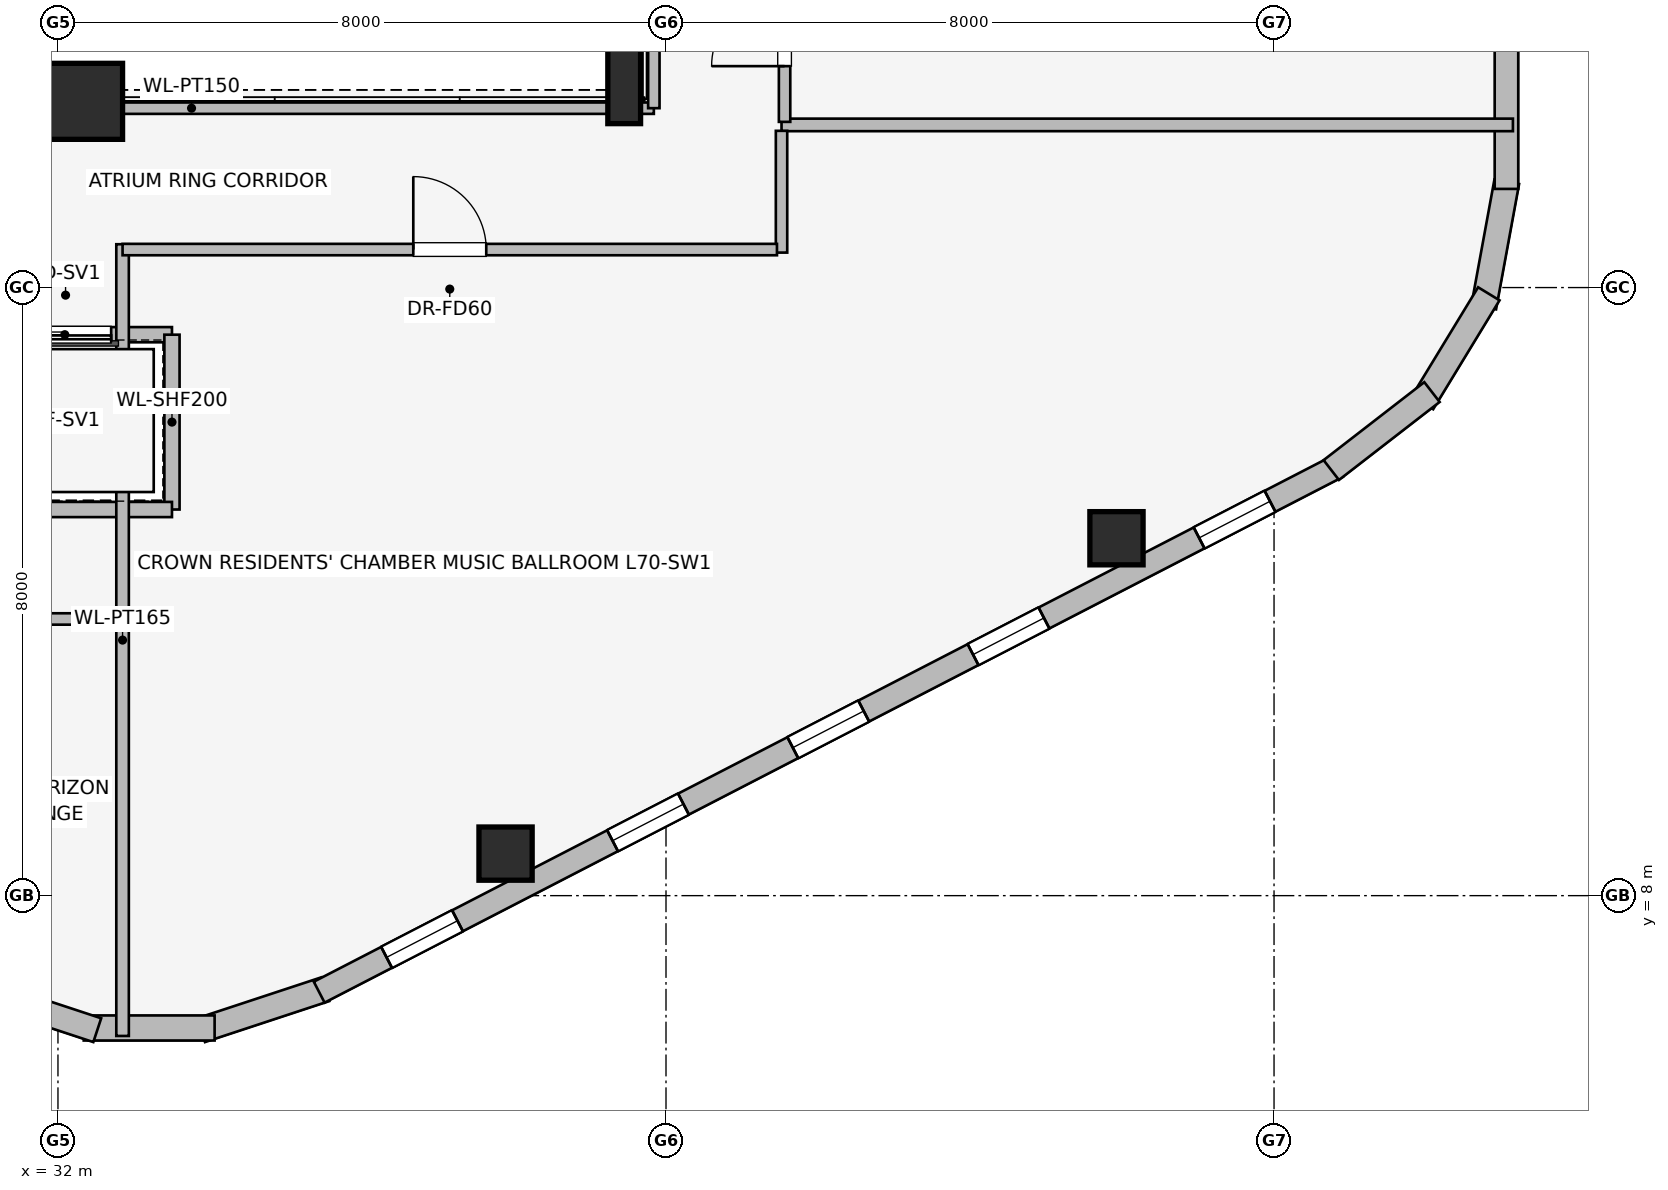
"""IFC4 building model, lengths in metres.
Left out: names, types, materials, properties, quantities, classifications, styles, units other than length and angle.
Written with IfcOpenShell. Run it as: python <this file> out.ifc"""

import sys

from ifc_helpers import new_model, si_unit, direction, frame, frame_2d, origin, origin_2d, place, context, subcontext, project, spatial, rectangle, i_section, extrude, element, fill, save


model = new_model("IFC4")
c1 = context("Model", 3, precision=1e-05, world=origin(), true_north=direction((0.0, 1.0)))
c2 = subcontext(c1, "Body", "Model", "MODEL_VIEW")
j1 = project(units=[si_unit("LENGTHUNIT", "METRE"), si_unit("PLANEANGLEUNIT", "RADIAN")], contexts=[c1])
p1 = place(None, origin())
s1 = spatial("IfcSite", under=j1, at=p1, CompositionType="ELEMENT")
p2 = place(p1, origin())
s2 = spatial("IfcBuilding", under=s1, at=p2, CompositionType="ELEMENT")
p3 = place(p2, frame((0.0, 0.0, 256.1)))
s3 = spatial("IfcBuildingStorey", under=s2, at=p3, CompositionType="ELEMENT", Elevation=256.1)
p4 = place(p3, frame((32.35, 18.45, 0.0), z_axis=(0.0, 0.0, 1.0), x_axis=(1.0, 0.0, 0.0)))
e1 = element("IfcColumn", 1, at=p4, inside=s3, PredefinedType="COLUMN", context=c2, shape_type="SweptSolid", body=[
    extrude(rectangle(XDim=1.0, YDim=1.0, at=origin_2d()), origin(), (0.0, 0.0, 1.0), 3.55),
])
for number, where, z_axis, x_axis in (
    (2, (37.889, 8.553, 0.0), (0.0, 0.0, 1.0), (1.0, 0.0, 0.0)),
    (3, (45.927, 12.702, 0.0), (0.0, 0.0, 1.0), (1.0, 0.0, 0.0)),
):
    element("IfcColumn", number, at=place(p3, frame(where, z_axis=z_axis, x_axis=x_axis)), inside=s3, PredefinedType="COLUMN", context=c2, shape_type="SweptSolid", body=[
        extrude(rectangle(XDim=0.7, YDim=0.7, at=origin_2d()), origin(), (0.0, 0.0, 1.0), 3.55),
    ])
p5 = place(p3, frame((39.45, 18.65, 0.0), z_axis=(0.0, 0.0, 1.0), x_axis=(1.0, 0.0, 0.0)))
e4 = element("IfcColumn", 4, at=p5, inside=s3, PredefinedType="COLUMN", context=c2, shape_type="SweptSolid", body=[
    extrude(i_section(OverallWidth=0.431, OverallDepth=0.987, WebThickness=0.034, FlangeThickness=0.062, at=origin_2d()), origin(), (0.0, 0.0, 1.0), 3.55),
])
p6 = place(p3, frame((35.518, 6.769, 0.0), z_axis=(0.0, 0.0, 1.0), x_axis=(-0.949713440491, -0.313120393699, 0.0)))
e5 = element("IfcWall", 5, at=p6, inside=s3, PredefinedType="STANDARD", context=c2, shape_type="SweptSolid", body=[
    extrude(rectangle(XDim=1.722, YDim=0.33, at=frame_2d((0.861, 0.0))), origin(), (0.0, 0.0, 1.0), 3.29),
])
p7 = place(p3, frame((34.061, 6.259, 0.0), z_axis=(0.0, 0.0, 1.0), x_axis=(-1.0, 0.0, 0.0)))
e6 = element("IfcWall", 6, at=p7, inside=s3, PredefinedType="STANDARD", context=c2, shape_type="SweptSolid", body=[
    extrude(rectangle(XDim=1.722, YDim=0.33, at=frame_2d((0.861, 0.0))), origin(), (0.0, 0.0, 1.0), 3.29),
])
p8 = place(p3, frame((32.517, 6.23, 0.0), z_axis=(0.0, 0.0, 1.0), x_axis=(-0.949713440491, 0.313120393699, 0.0)))
e7 = element("IfcWall", 7, at=p8, inside=s3, PredefinedType="STANDARD", context=c2, shape_type="SweptSolid", body=[
    extrude(rectangle(XDim=1.722, YDim=0.33, at=frame_2d((0.861, 0.0))), origin(), (0.0, 0.0, 1.0), 3.29),
])
p9 = place(p3, frame((48.834, 13.646, 0.0), z_axis=(0.0, 0.0, 1.0), x_axis=(-0.888581481622, -0.458718814218, 0.0)))
e8 = element("IfcWall", 8, at=p9, inside=s3, PredefinedType="STANDARD", context=c2, shape_type="SweptSolid", body=[
    extrude(rectangle(XDim=15.077, YDim=0.31, at=frame_2d((7.539, 0.0))), origin(), (0.0, 0.0, 1.0), 3.29),
])
p10 = place(p9, frame((0.998, 0.0, 0.75)))
e9 = element("IfcOpeningElement", 9, at=p10, cuts=e8, PredefinedType="OPENING", context=c2, shape_type="SweptSolid", body=[
    extrude(rectangle(XDim=1.05, YDim=1.4, at=frame_2d((0.525, 0.7))), frame((0.0, 0.165, 0.0), z_axis=(0.0, -1.0, 0.0), x_axis=(1.0, 0.0, 0.0)), (0.0, 0.0, 1.0), 0.33),
])
p11 = place(p9, frame((4.345, 0.0, 0.75)))
e10 = element("IfcOpeningElement", 10, at=p11, cuts=e8, PredefinedType="OPENING", context=c2, shape_type="SweptSolid", body=[
    extrude(rectangle(XDim=1.05, YDim=1.4, at=frame_2d((0.525, 0.7))), frame((0.0, 0.165, 0.0), z_axis=(0.0, -1.0, 0.0), x_axis=(1.0, 0.0, 0.0)), (0.0, 0.0, 1.0), 0.33),
])
p12 = place(p9, frame((7.014, 0.0, 0.75)))
e11 = element("IfcOpeningElement", 11, at=p12, cuts=e8, PredefinedType="OPENING", context=c2, shape_type="SweptSolid", body=[
    extrude(rectangle(XDim=1.05, YDim=1.4, at=frame_2d((0.525, 0.7))), frame((0.0, 0.165, 0.0), z_axis=(0.0, -1.0, 0.0), x_axis=(1.0, 0.0, 0.0)), (0.0, 0.0, 1.0), 0.33),
])
p13 = place(p9, frame((9.683, 0.0, 0.75)))
e12 = element("IfcOpeningElement", 12, at=p13, cuts=e8, PredefinedType="OPENING", context=c2, shape_type="SweptSolid", body=[
    extrude(rectangle(XDim=1.05, YDim=1.4, at=frame_2d((0.525, 0.7))), frame((0.0, 0.165, 0.0), z_axis=(0.0, -1.0, 0.0), x_axis=(1.0, 0.0, 0.0)), (0.0, 0.0, 1.0), 0.33),
])
p14 = place(p9, frame((13.029, 0.0, 0.75)))
e13 = element("IfcOpeningElement", 13, at=p14, cuts=e8, PredefinedType="OPENING", context=c2, shape_type="SweptSolid", body=[
    extrude(rectangle(XDim=1.05, YDim=1.4, at=frame_2d((0.525, 0.7))), frame((0.0, 0.165, 0.0), z_axis=(0.0, -1.0, 0.0), x_axis=(1.0, 0.0, 0.0)), (0.0, 0.0, 1.0), 0.33),
])
p15 = place(p3, frame((51.062, 17.392, 0.0), z_axis=(0.0, 0.0, 1.0), x_axis=(-0.180691763044, -0.983539773862, 0.0)))
e14 = element("IfcWall", 14, at=p15, inside=s3, PredefinedType="STANDARD", context=c2, shape_type="SweptSolid", body=[
    extrude(rectangle(XDim=1.677, YDim=0.33, at=frame_2d((0.838, 0.0))), origin(), (0.0, 0.0, 1.0), 3.29),
])
p16 = place(p3, frame((50.826, 15.918, 0.0), z_axis=(0.0, 0.0, 1.0), x_axis=(-0.520325409202, -0.853968072318, 0.0)))
e15 = element("IfcWall", 15, at=p16, inside=s3, PredefinedType="STANDARD", context=c2, shape_type="SweptSolid", body=[
    extrude(rectangle(XDim=1.678, YDim=0.33, at=frame_2d((0.839, 0.0))), origin(), (0.0, 0.0, 1.0), 3.29),
])
p17 = place(p3, frame((50.078, 14.625, 0.0), z_axis=(0.0, 0.0, 1.0), x_axis=(-0.790691856293, -0.61221433207, 0.0)))
e16 = element("IfcWall", 16, at=p17, inside=s3, PredefinedType="STANDARD", context=c2, shape_type="SweptSolid", body=[
    extrude(rectangle(XDim=1.676, YDim=0.33, at=frame_2d((0.838, 0.0))), origin(), (0.0, 0.0, 1.0), 3.29),
])
p18 = place(p3, frame((51.058, 30.702, 0.0), z_axis=(0.0, 0.0, 1.0), x_axis=(0.0, -1.0, 0.0)))
e17 = element("IfcWall", 17, at=p18, inside=s3, PredefinedType="STANDARD", context=c2, shape_type="SweptSolid", body=[
    extrude(rectangle(XDim=13.404, YDim=0.31, at=frame_2d((6.702, 0.0))), origin(), (0.0, 0.0, 1.0), 3.29),
])
p19 = place(p18, frame((6.652, 0.0, 0.0)))
e18 = element("IfcOpeningElement", 18, at=p19, cuts=e17, PredefinedType="OPENING", context=c2, shape_type="SweptSolid", body=[
    extrude(rectangle(XDim=1.1, YDim=2.04, at=frame_2d((0.55, 1.02))), frame((0.0, 0.165, 0.0), z_axis=(0.0, -1.0, 0.0), x_axis=(1.0, 0.0, 0.0)), (0.0, 0.0, 1.0), 0.33),
])
p20 = place(p18, frame((4.402, 0.0, 0.75)))
e19 = element("IfcOpeningElement", 19, at=p20, cuts=e17, PredefinedType="OPENING", context=c2, shape_type="SweptSolid", body=[
    extrude(rectangle(XDim=1.05, YDim=1.4, at=frame_2d((0.525, 0.7))), frame((0.0, 0.165, 0.0), z_axis=(0.0, -1.0, 0.0), x_axis=(1.0, 0.0, 0.0)), (0.0, 0.0, 1.0), 0.33),
])
p21 = place(p18, frame((8.369, 0.0, 0.75)))
e20 = element("IfcOpeningElement", 20, at=p21, cuts=e17, PredefinedType="OPENING", context=c2, shape_type="SweptSolid", body=[
    extrude(rectangle(XDim=1.05, YDim=1.4, at=frame_2d((0.525, 0.7))), frame((0.0, 0.165, 0.0), z_axis=(0.0, -1.0, 0.0), x_axis=(1.0, 0.0, 0.0)), (0.0, 0.0, 1.0), 0.33),
])
p22 = place(p3, frame((33.5, 15.38, 0.0), z_axis=(0.0, 0.0, 1.0), x_axis=(-1.0, 0.0, 0.0)))
e21 = element("IfcWall", 21, at=p22, inside=s3, PredefinedType="PARTITIONING", context=c2, shape_type="SweptSolid", body=[
    extrude(rectangle(XDim=2.82, YDim=0.2, at=frame_2d((1.41, 0.0))), origin(), (0.0, 0.0, 1.0), 3.29),
])
p23 = place(p22, frame((0.8, 0.0, 0.0)))
e22 = element("IfcOpeningElement", 22, at=p23, cuts=e21, PredefinedType="OPENING", context=c2, shape_type="SweptSolid", body=[
    extrude(rectangle(XDim=1.2, YDim=2.2, at=frame_2d((0.6, 1.1))), frame((0.0, 0.11, 0.0), z_axis=(0.0, -1.0, 0.0), x_axis=(1.0, 0.0, 0.0)), (0.0, 0.0, 1.0), 0.22),
])
p24 = place(p3, frame((33.5, 13.08, 0.0), z_axis=(0.0, 0.0, 1.0), x_axis=(0.0, 1.0, 0.0)))
e23 = element("IfcWall", 23, at=p24, inside=s3, PredefinedType="PARTITIONING", context=c2, shape_type="SweptSolid", body=[
    extrude(rectangle(XDim=2.3, YDim=0.2, at=frame_2d((1.15, 0.0))), origin(), (0.0, 0.0, 1.0), 3.29),
])
p25 = place(p3, frame((30.879, 13.08, 0.0), z_axis=(0.0, 0.0, 1.0), x_axis=(1.0, 0.0, 0.0)))
e24 = element("IfcWall", 24, at=p25, inside=s3, PredefinedType="PARTITIONING", context=c2, shape_type="SweptSolid", body=[
    extrude(rectangle(XDim=2.621, YDim=0.2, at=frame_2d((1.311, 0.0))), origin(), (0.0, 0.0, 1.0), 3.29),
])
p26 = place(p3, frame((27.675, 18.36, 0.0), z_axis=(0.0, 0.0, 1.0), x_axis=(1.0, 0.0, 0.0)))
e25 = element("IfcWall", 25, at=p26, inside=s3, PredefinedType="PARTITIONING", context=c2, shape_type="SweptSolid", body=[
    extrude(rectangle(XDim=12.165, YDim=0.15, at=frame_2d((6.083, 0.0))), origin(), (0.0, 0.0, 1.0), 2.431),
])
p27 = place(p3, frame((39.84, 18.36, 0.0), z_axis=(0.0, 0.0, 1.0), x_axis=(0.0, 1.0, 0.0)))
e26 = element("IfcWall", 26, at=p27, inside=s3, PredefinedType="PARTITIONING", context=c2, shape_type="SweptSolid", body=[
    extrude(rectangle(XDim=11.28, YDim=0.15, at=frame_2d((5.64, 0.0))), origin(), (0.0, 0.0, 1.0), 3.29),
])
p28 = place(p3, frame((32.85, 6.154, 0.0), z_axis=(0.0, 0.0, 1.0), x_axis=(0.0, 1.0, 0.0)))
e27 = element("IfcWall", 27, at=p28, inside=s3, PredefinedType="PARTITIONING", context=c2, shape_type="SweptSolid", body=[
    extrude(rectangle(XDim=10.416, YDim=0.165, at=frame_2d((5.208, 0.0))), origin(), (0.0, 0.0, 1.0), 3.29),
])
p29 = place(p3, frame((21.244, 11.64, 0.0), z_axis=(0.0, 0.0, 1.0), x_axis=(1.0, 0.0, 0.0)))
e28 = element("IfcWall", 28, at=p29, inside=s3, PredefinedType="PARTITIONING", context=c2, shape_type="SweptSolid", body=[
    extrude(rectangle(XDim=11.606, YDim=0.15, at=frame_2d((5.803, 0.0))), origin(), (0.0, 0.0, 1.0), 2.833),
])
p30 = place(p29, frame((4.856, 0.0, 0.0)))
e29 = element("IfcOpeningElement", 29, at=p30, cuts=e28, PredefinedType="OPENING", context=c2, shape_type="SweptSolid", body=[
    extrude(rectangle(XDim=0.9, YDim=2.0, at=frame_2d((0.45, 1.0))), frame((0.0, 0.085, 0.0), z_axis=(0.0, -1.0, 0.0), x_axis=(1.0, 0.0, 0.0)), (0.0, 0.0, 1.0), 0.17),
])
p31 = place(p29, frame((8.306, 0.0, 0.0)))
e30 = element("IfcOpeningElement", 30, at=p31, cuts=e28, PredefinedType="OPENING", context=c2, shape_type="SweptSolid", body=[
    extrude(rectangle(XDim=0.9, YDim=2.0, at=frame_2d((0.45, 1.0))), frame((0.0, 0.085, 0.0), z_axis=(0.0, -1.0, 0.0), x_axis=(1.0, 0.0, 0.0)), (0.0, 0.0, 1.0), 0.17),
])
p32 = place(p3, frame((41.52, 18.14, 0.0), z_axis=(0.0, 0.0, 1.0), x_axis=(1.0, 0.0, 0.0)))
e31 = element("IfcWall", 31, at=p32, inside=s3, PredefinedType="PARTITIONING", context=c2, shape_type="SweptSolid", body=[
    extrude(rectangle(XDim=9.623, YDim=0.165, at=frame_2d((4.812, 0.0))), origin(), (0.0, 0.0, 1.0), 3.29),
])
p33 = place(p3, frame((41.56, 18.18, 0.0), z_axis=(0.0, 0.0, 1.0), x_axis=(0.0, 1.0, 0.0)))
e32 = element("IfcWall", 32, at=p33, inside=s3, PredefinedType="PARTITIONING", context=c2, shape_type="SweptSolid", body=[
    extrude(rectangle(XDim=2.426, YDim=0.15, at=frame_2d((1.213, 0.0))), origin(), (0.0, 0.0, 1.0), 3.29),
])
p34 = place(p33, frame((0.733, 0.0, 0.0)))
e33 = element("IfcOpeningElement", 33, at=p34, cuts=e32, PredefinedType="OPENING", context=c2, shape_type="SweptSolid", body=[
    extrude(rectangle(XDim=0.96, YDim=2.0, at=frame_2d((0.48, 1.0))), frame((0.0, 0.085, 0.0), z_axis=(0.0, -1.0, 0.0), x_axis=(1.0, 0.0, 0.0)), (0.0, 0.0, 1.0), 0.17),
])
p35 = place(p3, frame((41.52, 16.46, 0.0), z_axis=(0.0, 0.0, 1.0), x_axis=(0.0, 1.0, 0.0)))
e34 = element("IfcWall", 34, at=p35, inside=s3, PredefinedType="PARTITIONING", context=c2, shape_type="SweptSolid", body=[
    extrude(rectangle(XDim=1.602, YDim=0.15, at=frame_2d((0.801, 0.0))), origin(), (0.0, 0.0, 1.0), 3.29),
])
p36 = place(p3, frame((32.85, 16.5, 0.0), z_axis=(0.0, 0.0, 1.0), x_axis=(1.0, 0.0, 0.0)))
e35 = element("IfcWall", 35, at=p36, inside=s3, PredefinedType="PARTITIONING", context=c2, shape_type="SweptSolid", body=[
    extrude(rectangle(XDim=8.61, YDim=0.15, at=frame_2d((4.305, 0.0))), origin(), (0.0, 0.0, 1.0), 3.29),
])
p37 = place(p36, frame((3.825, 0.0, 0.0)))
e36 = element("IfcOpeningElement", 36, at=p37, cuts=e35, PredefinedType="OPENING", context=c2, shape_type="SweptSolid", body=[
    extrude(rectangle(XDim=0.96, YDim=2.0, at=frame_2d((0.48, 1.0))), frame((0.0, 0.085, 0.0), z_axis=(0.0, -1.0, 0.0), x_axis=(1.0, 0.0, 0.0)), (0.0, 0.0, 1.0), 0.17),
])
p38 = place(p10, origin())
e37 = element("IfcWindow", 37, at=p38, inside=s3, PartitioningType="SINGLE_PANEL", PredefinedType="WINDOW", context=c2, shape_type="SweptSolid", body=[
    extrude(rectangle(XDim=1.05, YDim=1.4, at=frame_2d((0.525, 0.7))), frame((0.0, 0.03, 0.0), z_axis=(0.0, -1.0, 0.0), x_axis=(1.0, 0.0, 0.0)), (0.0, 0.0, 1.0), 0.06),
])
fill(e9, e37)
p39 = place(p11, origin())
e38 = element("IfcWindow", 38, at=p39, inside=s3, PartitioningType="SINGLE_PANEL", PredefinedType="WINDOW", context=c2, shape_type="SweptSolid", body=[
    extrude(rectangle(XDim=1.05, YDim=1.4, at=frame_2d((0.525, 0.7))), frame((0.0, 0.03, 0.0), z_axis=(0.0, -1.0, 0.0), x_axis=(1.0, 0.0, 0.0)), (0.0, 0.0, 1.0), 0.06),
])
fill(e10, e38)
p40 = place(p12, origin())
e39 = element("IfcWindow", 39, at=p40, inside=s3, PartitioningType="SINGLE_PANEL", PredefinedType="WINDOW", context=c2, shape_type="SweptSolid", body=[
    extrude(rectangle(XDim=1.05, YDim=1.4, at=frame_2d((0.525, 0.7))), frame((0.0, 0.03, 0.0), z_axis=(0.0, -1.0, 0.0), x_axis=(1.0, 0.0, 0.0)), (0.0, 0.0, 1.0), 0.06),
])
fill(e11, e39)
p41 = place(p13, origin())
e40 = element("IfcWindow", 40, at=p41, inside=s3, PartitioningType="SINGLE_PANEL", PredefinedType="WINDOW", context=c2, shape_type="SweptSolid", body=[
    extrude(rectangle(XDim=1.05, YDim=1.4, at=frame_2d((0.525, 0.7))), frame((0.0, 0.03, 0.0), z_axis=(0.0, -1.0, 0.0), x_axis=(1.0, 0.0, 0.0)), (0.0, 0.0, 1.0), 0.06),
])
fill(e12, e40)
p42 = place(p14, origin())
e41 = element("IfcWindow", 41, at=p42, inside=s3, PartitioningType="SINGLE_PANEL", PredefinedType="WINDOW", context=c2, shape_type="SweptSolid", body=[
    extrude(rectangle(XDim=1.05, YDim=1.4, at=frame_2d((0.525, 0.7))), frame((0.0, 0.03, 0.0), z_axis=(0.0, -1.0, 0.0), x_axis=(1.0, 0.0, 0.0)), (0.0, 0.0, 1.0), 0.06),
])
fill(e13, e41)
p43 = place(p23, origin())
e42 = element("IfcDoor", 42, at=p43, inside=s3, OperationType="SLIDING_TO_RIGHT", PredefinedType="DOOR", context=c2, shape_type="SweptSolid", body=[
    extrude(rectangle(XDim=1.2, YDim=2.2, at=frame_2d((0.6, 1.1))), frame((0.0, 0.025, 0.0), z_axis=(0.0, -1.0, 0.0), x_axis=(1.0, 0.0, 0.0)), (0.0, 0.0, 1.0), 0.05),
])
fill(e22, e42)
p44 = place(p34, origin())
e43 = element("IfcDoor", 43, at=p44, inside=s3, OperationType="SINGLE_SWING_LEFT", PredefinedType="DOOR", context=c2, shape_type="SweptSolid", body=[
    extrude(rectangle(XDim=0.96, YDim=2.0, at=frame_2d((0.48, 1.0))), frame((0.0, 0.025, 0.0), z_axis=(0.0, -1.0, 0.0), x_axis=(1.0, 0.0, 0.0)), (0.0, 0.0, 1.0), 0.05),
])
fill(e33, e43)
p45 = place(p37, origin())
e44 = element("IfcDoor", 44, at=p45, inside=s3, OperationType="SINGLE_SWING_LEFT", PredefinedType="DOOR", context=c2, shape_type="SweptSolid", body=[
    extrude(rectangle(XDim=0.96, YDim=2.0, at=frame_2d((0.48, 1.0))), frame((0.0, 0.025, 0.0), z_axis=(0.0, -1.0, 0.0), x_axis=(1.0, 0.0, 0.0)), (0.0, 0.0, 1.0), 0.05),
])
fill(e36, e44)
save(model, sys.argv[1])
